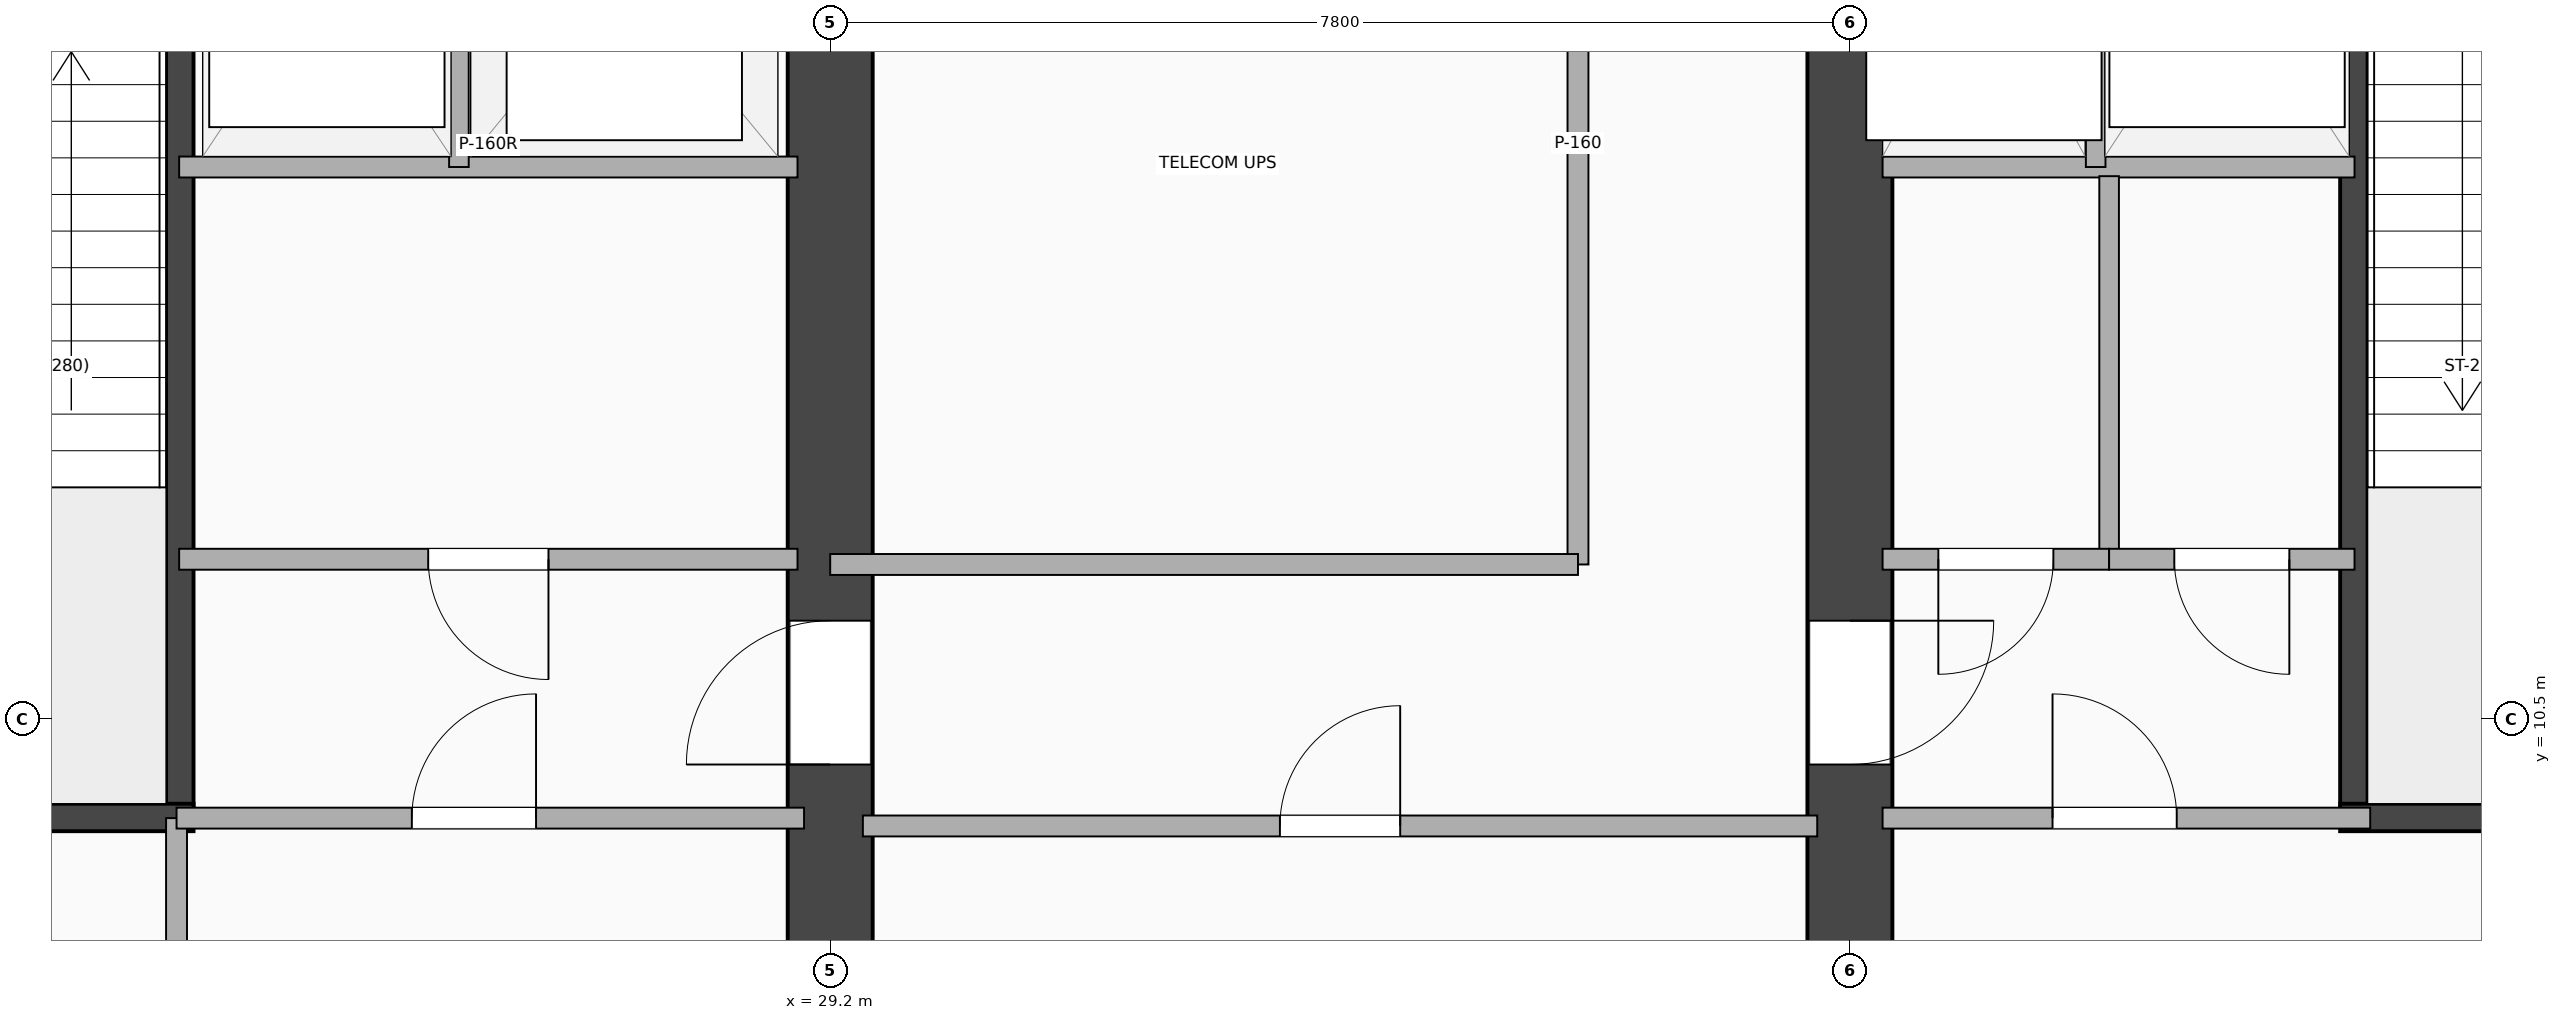
"""IFC4 building model, lengths in metres.
Left out: names, types, materials, properties, quantities, classifications, styles, units other than length and angle.
Written with IfcOpenShell. Run it as: python <this file> out.ifc"""

import sys

from ifc_helpers import new_model, si_unit, direction, frame, frame_2d, origin, place, context, subcontext, project, spatial, rectangle, extrude, element, fill, save


model = new_model("IFC4")
c1 = context("Model", 3, precision=1e-05, world=origin(), true_north=direction((0.0, 1.0)))
c2 = subcontext(c1, "Body", "Model", "MODEL_VIEW")
j1 = project(units=[si_unit("LENGTHUNIT", "METRE"), si_unit("PLANEANGLEUNIT", "RADIAN")], contexts=[c1])
p1 = place(None, origin())
s1 = spatial("IfcSite", under=j1, at=p1, CompositionType="ELEMENT")
p2 = place(p1, origin())
s2 = spatial("IfcBuilding", under=s1, at=p2, CompositionType="ELEMENT")
p3 = place(p2, frame((0.0, 0.0, -5.4)))
s3 = spatial("IfcBuildingStorey", under=s2, at=p3, CompositionType="ELEMENT", Elevation=-5.4)
p4 = place(p3, frame((29.2, 3.5, 0.0), z_axis=(0.0, 0.0, 1.0), x_axis=(0.0, 1.0, 0.0)))
e1 = element("IfcWall", 1, at=p4, inside=s3, PredefinedType="SHEAR", context=c2, shape_type="SweptSolid", body=[
    extrude(rectangle(XDim=16.9, YDim=0.65, at=frame_2d((8.45, 0.0))), origin(), (0.0, 0.0, 1.0), 5.05),
])
p5 = place(p4, frame((7.75, 0.0, 0.0), z_axis=(0.0, 0.0, 1.0), x_axis=(-1.0, 0.0, 0.0)))
e2 = element("IfcOpeningElement", 2, at=p5, cuts=e1, PredefinedType="OPENING", context=c2, shape_type="SweptSolid", body=[
    extrude(rectangle(XDim=1.1, YDim=2.15, at=frame_2d((0.55, 1.075))), frame((0.0, 0.335, 0.0), z_axis=(0.0, -1.0, 0.0), x_axis=(1.0, 0.0, 0.0)), (0.0, 0.0, 1.0), 0.67),
])
p6 = place(p3, frame((37.0, 3.5, 0.0), z_axis=(0.0, 0.0, 1.0), x_axis=(0.0, 1.0, 0.0)))
e3 = element("IfcWall", 3, at=p6, inside=s3, PredefinedType="SHEAR", context=c2, shape_type="SweptSolid", body=[
    extrude(rectangle(XDim=16.9, YDim=0.65, at=frame_2d((8.45, 0.0))), origin(), (0.0, 0.0, 1.0), 5.05),
])
p7 = place(p6, frame((6.65, 0.0, 0.0)))
e4 = element("IfcOpeningElement", 4, at=p7, cuts=e3, PredefinedType="OPENING", context=c2, shape_type="SweptSolid", body=[
    extrude(rectangle(XDim=1.1, YDim=2.15, at=frame_2d((0.55, 1.075))), frame((0.0, 0.335, 0.0), z_axis=(0.0, -1.0, 0.0), x_axis=(1.0, 0.0, 0.0)), (0.0, 0.0, 1.0), 0.67),
])
p8 = place(p3, frame((24.225, 9.745, 0.0), z_axis=(0.0, 0.0, 1.0), x_axis=(0.0, 1.0, 0.0)))
e5 = element("IfcWall", 5, at=p8, inside=s3, PredefinedType="SHEAR", context=c2, shape_type="SweptSolid", body=[
    extrude(rectangle(XDim=8.01, YDim=0.21, at=frame_2d((4.005, 0.0))), origin(), (0.0, 0.0, 1.0), 5.05),
])
p9 = place(p3, frame((20.67, 9.745, 0.0), z_axis=(0.0, 0.0, 1.0), x_axis=(1.0, 0.0, 0.0)))
e6 = element("IfcWall", 6, at=p9, inside=s3, PredefinedType="SHEAR", context=c2, shape_type="SweptSolid", body=[
    extrude(rectangle(XDim=3.66, YDim=0.21, at=frame_2d((1.83, 0.0))), origin(), (0.0, 0.0, 1.0), 5.05),
])
p10 = place(p3, frame((40.855, 9.745, 0.0), z_axis=(0.0, 0.0, 1.0), x_axis=(0.0, 1.0, 0.0)))
e7 = element("IfcWall", 7, at=p10, inside=s3, PredefinedType="SHEAR", context=c2, shape_type="SweptSolid", body=[
    extrude(rectangle(XDim=8.01, YDim=0.21, at=frame_2d((4.005, 0.0))), origin(), (0.0, 0.0, 1.0), 5.05),
])
p11 = place(p3, frame((40.75, 9.745, 0.0), z_axis=(0.0, 0.0, 1.0), x_axis=(1.0, 0.0, 0.0)))
e8 = element("IfcWall", 8, at=p11, inside=s3, PredefinedType="SHEAR", context=c2, shape_type="SweptSolid", body=[
    extrude(rectangle(XDim=3.66, YDim=0.21, at=frame_2d((1.83, 0.0))), origin(), (0.0, 0.0, 1.0), 5.05),
])
p12 = place(p3, frame((24.22, 14.72, 0.0), z_axis=(0.0, 0.0, 1.0), x_axis=(1.0, 0.0, 0.0)))
e9 = element("IfcWall", 9, at=p12, inside=s3, PredefinedType="PARTITIONING", context=c2, shape_type="SweptSolid", body=[
    extrude(rectangle(XDim=4.73, YDim=0.16, at=frame_2d((2.365, 0.0))), origin(), (0.0, 0.0, 1.0), 4.18),
])
p13 = place(p3, frame((26.36, 14.72, 0.0), z_axis=(0.0, 0.0, 1.0), x_axis=(0.0, 1.0, 0.0)))
e10 = element("IfcWall", 10, at=p13, inside=s3, PredefinedType="PARTITIONING", context=c2, shape_type="SweptSolid", body=[
    extrude(rectangle(XDim=3.04, YDim=0.15, at=frame_2d((1.52, 0.0))), origin(), (0.0, 0.0, 1.0), 5.05),
])
p14 = place(p3, frame((37.25, 14.72, 0.0), z_axis=(0.0, 0.0, 1.0), x_axis=(1.0, 0.0, 0.0)))
e11 = element("IfcWall", 11, at=p14, inside=s3, PredefinedType="PARTITIONING", context=c2, shape_type="SweptSolid", body=[
    extrude(rectangle(XDim=3.61, YDim=0.16, at=frame_2d((1.805, 0.0))), origin(), (0.0, 0.0, 1.0), 4.18),
])
p15 = place(p3, frame((38.88, 14.72, 0.0), z_axis=(0.0, 0.0, 1.0), x_axis=(0.0, 1.0, 0.0)))
e12 = element("IfcWall", 12, at=p15, inside=s3, PredefinedType="PARTITIONING", context=c2, shape_type="SweptSolid", body=[
    extrude(rectangle(XDim=3.04, YDim=0.15, at=frame_2d((1.52, 0.0))), origin(), (0.0, 0.0, 1.0), 5.05),
])
p16 = place(p3, frame((24.22, 11.72, 0.0), z_axis=(0.0, 0.0, 1.0), x_axis=(1.0, 0.0, 0.0)))
e13 = element("IfcWall", 13, at=p16, inside=s3, PredefinedType="PARTITIONING", context=c2, shape_type="SweptSolid", body=[
    extrude(rectangle(XDim=4.73, YDim=0.16, at=frame_2d((2.365, 0.0))), origin(), (0.0, 0.0, 1.0), 4.18),
])
p17 = place(p16, frame((1.905, 0.0, 0.0)))
e14 = element("IfcOpeningElement", 14, at=p17, cuts=e13, PredefinedType="OPENING", context=c2, shape_type="SweptSolid", body=[
    extrude(rectangle(XDim=0.92, YDim=2.08, at=frame_2d((0.46, 1.04))), frame((0.0, 0.09, 0.0), z_axis=(0.0, -1.0, 0.0), x_axis=(1.0, 0.0, 0.0)), (0.0, 0.0, 1.0), 0.18),
])
p18 = place(p3, frame((38.983, 11.72, 0.0), z_axis=(0.0, 0.0, 1.0), x_axis=(0.0, 1.0, 0.0)))
e15 = element("IfcWall", 15, at=p18, inside=s3, PredefinedType="PARTITIONING", context=c2, shape_type="SweptSolid", body=[
    extrude(rectangle(XDim=2.93, YDim=0.15, at=frame_2d((1.465, 0.0))), origin(), (0.0, 0.0, 1.0), 5.05),
])
p19 = place(p3, frame((37.25, 11.72, 0.0), z_axis=(0.0, 0.0, 1.0), x_axis=(1.0, 0.0, 0.0)))
e16 = element("IfcWall", 16, at=p19, inside=s3, PredefinedType="PARTITIONING", context=c2, shape_type="SweptSolid", body=[
    extrude(rectangle(XDim=1.733, YDim=0.16, at=frame_2d((0.866, 0.0))), origin(), (0.0, 0.0, 1.0), 4.18),
])
p20 = place(p19, frame((0.427, 0.0, 0.0)))
e17 = element("IfcOpeningElement", 17, at=p20, cuts=e16, PredefinedType="OPENING", context=c2, shape_type="SweptSolid", body=[
    extrude(rectangle(XDim=0.88, YDim=2.08, at=frame_2d((0.44, 1.04))), frame((0.0, 0.09, 0.0), z_axis=(0.0, -1.0, 0.0), x_axis=(1.0, 0.0, 0.0)), (0.0, 0.0, 1.0), 0.18),
])
p21 = place(p3, frame((38.983, 11.72, 0.0), z_axis=(0.0, 0.0, 1.0), x_axis=(1.0, 0.0, 0.0)))
e18 = element("IfcWall", 18, at=p21, inside=s3, PredefinedType="PARTITIONING", context=c2, shape_type="SweptSolid", body=[
    extrude(rectangle(XDim=1.877, YDim=0.16, at=frame_2d((0.938, 0.0))), origin(), (0.0, 0.0, 1.0), 5.05),
])
p22 = place(p21, frame((0.499, 0.0, 0.0)))
e19 = element("IfcOpeningElement", 19, at=p22, cuts=e18, PredefinedType="OPENING", context=c2, shape_type="SweptSolid", body=[
    extrude(rectangle(XDim=0.88, YDim=2.08, at=frame_2d((0.44, 1.04))), frame((0.0, 0.09, 0.0), z_axis=(0.0, -1.0, 0.0), x_axis=(1.0, 0.0, 0.0)), (0.0, 0.0, 1.0), 0.18),
])
p23 = place(p3, frame((24.2, 3.95, 0.0), z_axis=(0.0, 0.0, 1.0), x_axis=(0.0, 1.0, 0.0)))
e20 = element("IfcWall", 20, at=p23, inside=s3, PredefinedType="PARTITIONING", context=c2, shape_type="SweptSolid", body=[
    extrude(rectangle(XDim=5.79, YDim=0.16, at=frame_2d((2.895, 0.0))), origin(), (0.0, 0.0, 1.0), 4.114),
])
p24 = place(p23, frame((2.2, 0.0, 0.0)))
e21 = element("IfcOpeningElement", 21, at=p24, cuts=e20, PredefinedType="OPENING", context=c2, shape_type="SweptSolid", body=[
    extrude(rectangle(XDim=0.92, YDim=2.08, at=frame_2d((0.46, 1.04))), frame((0.0, 0.09, 0.0), z_axis=(0.0, -1.0, 0.0), x_axis=(1.0, 0.0, 0.0)), (0.0, 0.0, 1.0), 0.18),
])
p25 = place(p3, frame((24.2, 9.74, 0.0), z_axis=(0.0, 0.0, 1.0), x_axis=(1.0, 0.0, 0.0)))
e22 = element("IfcWall", 22, at=p25, inside=s3, PredefinedType="PARTITIONING", context=c2, shape_type="SweptSolid", body=[
    extrude(rectangle(XDim=4.8, YDim=0.16, at=frame_2d((2.4, 0.0))), origin(), (0.0, 0.0, 1.0), 4.18),
])
p26 = place(p25, frame((2.75, 0.0, 0.0), z_axis=(0.0, 0.0, 1.0), x_axis=(-1.0, 0.0, 0.0)))
e23 = element("IfcOpeningElement", 23, at=p26, cuts=e22, PredefinedType="OPENING", context=c2, shape_type="SweptSolid", body=[
    extrude(rectangle(XDim=0.95, YDim=2.15, at=frame_2d((0.475, 1.075))), frame((0.0, 0.09, 0.0), z_axis=(0.0, -1.0, 0.0), x_axis=(1.0, 0.0, 0.0)), (0.0, 0.0, 1.0), 0.18),
])
p27 = place(p3, frame((37.25, 9.74, 0.0), z_axis=(0.0, 0.0, 1.0), x_axis=(1.0, 0.0, 0.0)))
e24 = element("IfcWall", 24, at=p27, inside=s3, PredefinedType="PARTITIONING", context=c2, shape_type="SweptSolid", body=[
    extrude(rectangle(XDim=3.73, YDim=0.16, at=frame_2d((1.865, 0.0))), origin(), (0.0, 0.0, 1.0), 4.18),
])
p28 = place(p27, frame((2.25, 0.0, 0.0), z_axis=(0.0, 0.0, 1.0), x_axis=(-1.0, 0.0, 0.0)))
e25 = element("IfcOpeningElement", 25, at=p28, cuts=e24, PredefinedType="OPENING", context=c2, shape_type="SweptSolid", body=[
    extrude(rectangle(XDim=0.95, YDim=2.15, at=frame_2d((0.475, 1.075))), frame((0.0, 0.09, 0.0), z_axis=(0.0, -1.0, 0.0), x_axis=(1.0, 0.0, 0.0)), (0.0, 0.0, 1.0), 0.18),
])
p29 = place(p3, frame((34.92, 11.68, 0.0), z_axis=(0.0, 0.0, 1.0), x_axis=(0.0, 1.0, 0.0)))
e26 = element("IfcWall", 26, at=p29, inside=s3, PredefinedType="PARTITIONING", context=c2, shape_type="SweptSolid", body=[
    extrude(rectangle(XDim=6.1, YDim=0.16, at=frame_2d((3.05, 0.0))), origin(), (0.0, 0.0, 1.0), 5.05),
])
p30 = place(p3, frame((29.45, 9.68, 0.0), z_axis=(0.0, 0.0, 1.0), x_axis=(1.0, 0.0, 0.0)))
e27 = element("IfcWall", 27, at=p30, inside=s3, PredefinedType="PARTITIONING", context=c2, shape_type="SweptSolid", body=[
    extrude(rectangle(XDim=7.3, YDim=0.16, at=frame_2d((3.65, 0.0))), origin(), (0.0, 0.0, 1.0), 4.18),
])
p31 = place(p30, frame((4.11, 0.0, 0.0), z_axis=(0.0, 0.0, 1.0), x_axis=(-1.0, 0.0, 0.0)))
e28 = element("IfcOpeningElement", 28, at=p31, cuts=e27, PredefinedType="OPENING", context=c2, shape_type="SweptSolid", body=[
    extrude(rectangle(XDim=0.92, YDim=2.08, at=frame_2d((0.46, 1.04))), frame((0.0, 0.09, 0.0), z_axis=(0.0, -1.0, 0.0), x_axis=(1.0, 0.0, 0.0)), (0.0, 0.0, 1.0), 0.18),
])
p32 = place(p3, frame((29.2, 11.68, 0.0), z_axis=(0.0, 0.0, 1.0), x_axis=(1.0, 0.0, 0.0)))
e29 = element("IfcWall", 29, at=p32, inside=s3, PredefinedType="PARTITIONING", context=c2, shape_type="SweptSolid", body=[
    extrude(rectangle(XDim=5.72, YDim=0.16, at=frame_2d((2.86, 0.0))), origin(), (0.0, 0.0, 1.0), 4.18),
])
p33 = place(p5, origin())
e30 = element("IfcDoor", 30, at=p33, inside=s3, OperationType="SINGLE_SWING_LEFT", PredefinedType="DOOR", context=c2, shape_type="SweptSolid", body=[
    extrude(rectangle(XDim=1.1, YDim=2.15, at=frame_2d((0.55, 1.075))), frame((0.0, 0.025, 0.0), z_axis=(0.0, -1.0, 0.0), x_axis=(1.0, 0.0, 0.0)), (0.0, 0.0, 1.0), 0.05),
])
fill(e2, e30)
p34 = place(p7, origin())
e31 = element("IfcDoor", 31, at=p34, inside=s3, OperationType="SINGLE_SWING_RIGHT", PredefinedType="DOOR", context=c2, shape_type="SweptSolid", body=[
    extrude(rectangle(XDim=1.1, YDim=2.15, at=frame_2d((0.55, 1.075))), frame((0.0, 0.025, 0.0), z_axis=(0.0, -1.0, 0.0), x_axis=(1.0, 0.0, 0.0)), (0.0, 0.0, 1.0), 0.05),
])
fill(e4, e31)
p35 = place(p17, origin())
e32 = element("IfcDoor", 32, at=p35, inside=s3, OperationType="SINGLE_SWING_RIGHT", PredefinedType="DOOR", context=c2, shape_type="SweptSolid", body=[
    extrude(rectangle(XDim=0.92, YDim=2.08, at=frame_2d((0.46, 1.04))), frame((0.0, 0.025, 0.0), z_axis=(0.0, -1.0, 0.0), x_axis=(1.0, 0.0, 0.0)), (0.0, 0.0, 1.0), 0.05),
])
fill(e14, e32)
p36 = place(p20, origin())
e33 = element("IfcDoor", 33, at=p36, inside=s3, OperationType="SINGLE_SWING_LEFT", PredefinedType="DOOR", context=c2, shape_type="SweptSolid", body=[
    extrude(rectangle(XDim=0.88, YDim=2.08, at=frame_2d((0.44, 1.04))), frame((0.0, 0.025, 0.0), z_axis=(0.0, -1.0, 0.0), x_axis=(1.0, 0.0, 0.0)), (0.0, 0.0, 1.0), 0.05),
])
fill(e17, e33)
p37 = place(p22, origin())
e34 = element("IfcDoor", 34, at=p37, inside=s3, OperationType="SINGLE_SWING_RIGHT", PredefinedType="DOOR", context=c2, shape_type="SweptSolid", body=[
    extrude(rectangle(XDim=0.88, YDim=2.08, at=frame_2d((0.44, 1.04))), frame((0.0, 0.025, 0.0), z_axis=(0.0, -1.0, 0.0), x_axis=(1.0, 0.0, 0.0)), (0.0, 0.0, 1.0), 0.05),
])
fill(e19, e34)
p38 = place(p26, origin())
e35 = element("IfcDoor", 35, at=p38, inside=s3, OperationType="SINGLE_SWING_RIGHT", PredefinedType="DOOR", context=c2, shape_type="SweptSolid", body=[
    extrude(rectangle(XDim=0.95, YDim=2.15, at=frame_2d((0.475, 1.075))), frame((0.0, 0.025, 0.0), z_axis=(0.0, -1.0, 0.0), x_axis=(1.0, 0.0, 0.0)), (0.0, 0.0, 1.0), 0.05),
])
fill(e23, e35)
p39 = place(p28, origin())
e36 = element("IfcDoor", 36, at=p39, inside=s3, OperationType="SINGLE_SWING_LEFT", PredefinedType="DOOR", context=c2, shape_type="SweptSolid", body=[
    extrude(rectangle(XDim=0.95, YDim=2.15, at=frame_2d((0.475, 1.075))), frame((0.0, 0.025, 0.0), z_axis=(0.0, -1.0, 0.0), x_axis=(1.0, 0.0, 0.0)), (0.0, 0.0, 1.0), 0.05),
])
fill(e25, e36)
p40 = place(p31, origin())
e37 = element("IfcDoor", 37, at=p40, inside=s3, OperationType="SINGLE_SWING_RIGHT", PredefinedType="DOOR", context=c2, shape_type="SweptSolid", body=[
    extrude(rectangle(XDim=0.92, YDim=2.08, at=frame_2d((0.46, 1.04))), frame((0.0, 0.025, 0.0), z_axis=(0.0, -1.0, 0.0), x_axis=(1.0, 0.0, 0.0)), (0.0, 0.0, 1.0), 0.05),
])
fill(e28, e37)
save(model, sys.argv[1])
